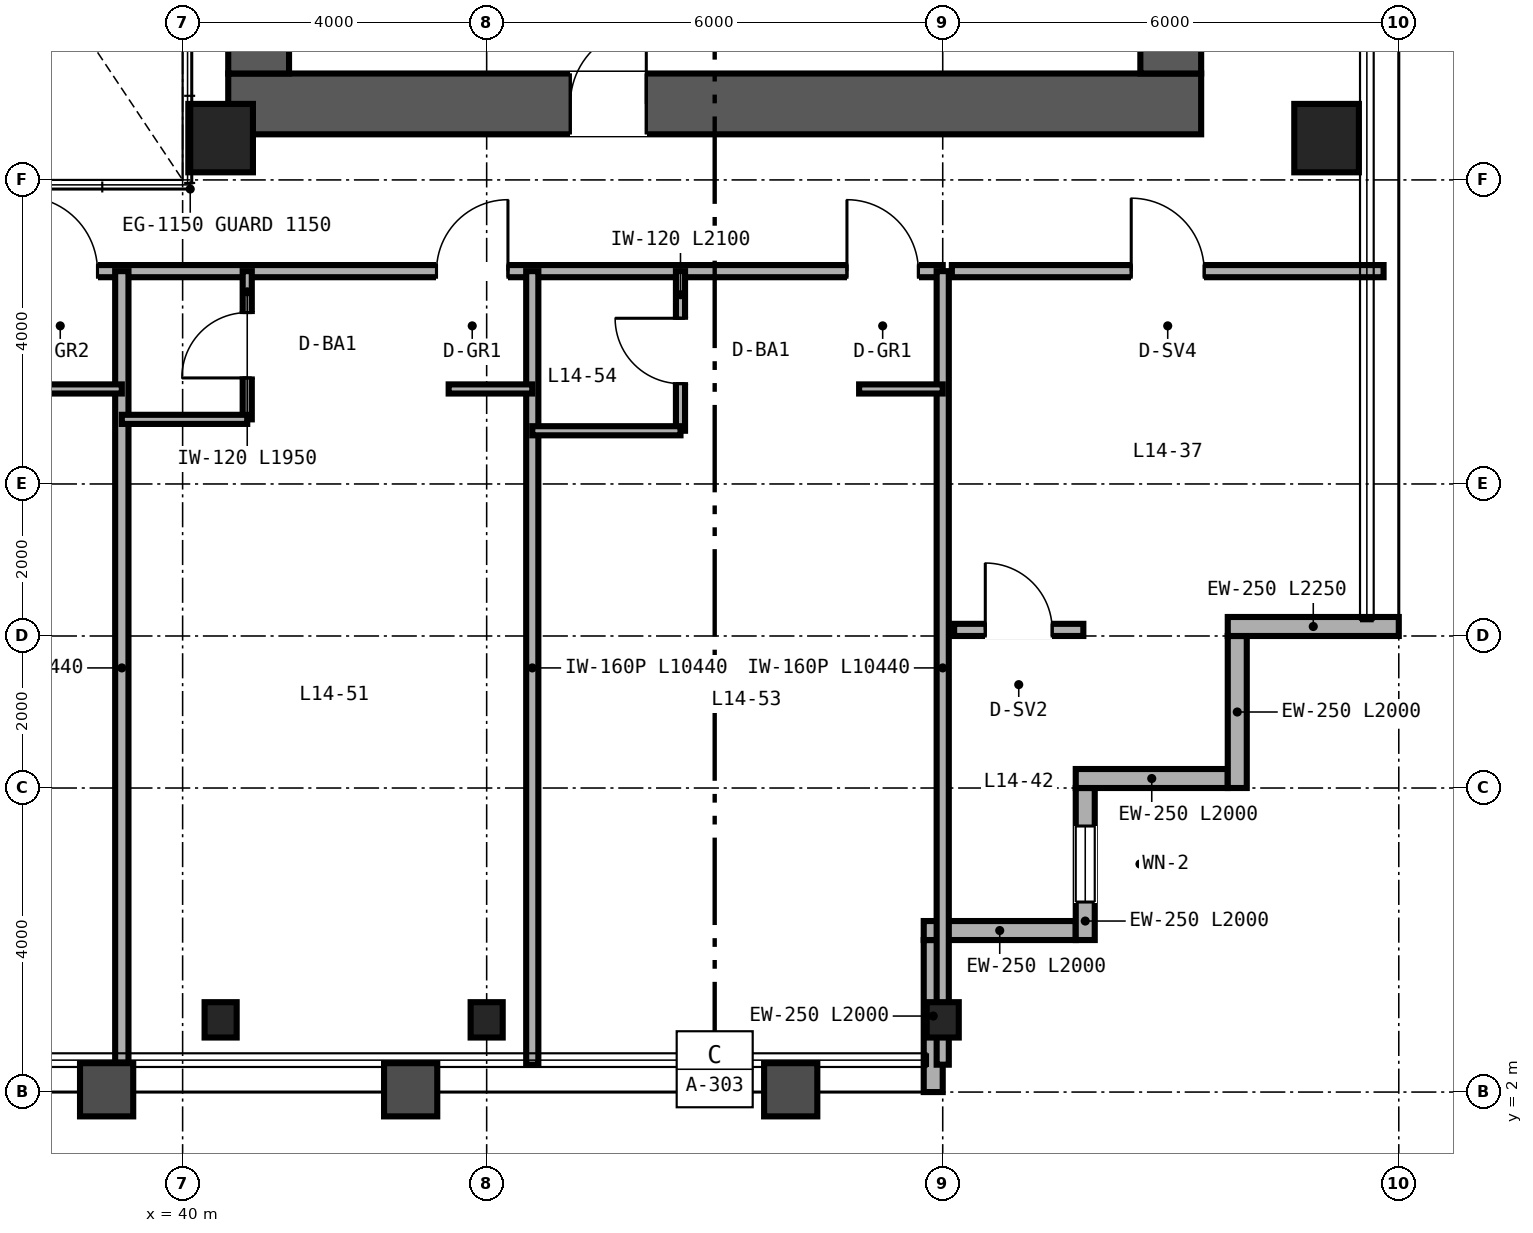
"""IFC4 building model, lengths in metres.
Left out: names, types, materials, properties, quantities, classifications, styles, units other than length and angle.
Written with IfcOpenShell. Run it as: python <this file> out.ifc"""

import sys

from ifc_helpers import new_model, si_unit, direction, frame, frame_2d, origin, origin_2d, place, context, subcontext, project, spatial, rectangle, hollow_rectangle, i_section, extrude, source, transform, mapped, element, fill, save


model = new_model("IFC4")
c1 = context("Model", 3, precision=1e-05, world=origin(), true_north=direction((0.0, 1.0)))
c2 = subcontext(c1, "Body", "Model", "MODEL_VIEW")
j1 = project(units=[si_unit("LENGTHUNIT", "METRE"), si_unit("PLANEANGLEUNIT", "RADIAN")], contexts=[c1])
p1 = place(None, origin())
s1 = spatial("IfcSite", under=j1, at=p1, CompositionType="ELEMENT")
p2 = place(p1, origin())
s2 = spatial("IfcBuilding", under=s1, at=p2, CompositionType="ELEMENT")
p3 = place(p2, frame((0.0, 0.0, 60.0)))
s3 = spatial("IfcBuildingStorey", under=s2, at=p3, CompositionType="ELEMENT", Elevation=60.0)
p4 = place(p3, frame((40.6, 15.0, 0.0), z_axis=(0.0, 0.0, 1.0), x_axis=(1.0, 0.0, 0.0)))
e1 = element("IfcWall", 1, at=p4, inside=s3, PredefinedType="SHEAR", context=c2, shape_type="SweptSolid", body=[
    extrude(rectangle(XDim=12.8, YDim=0.8, at=frame_2d((6.4, 0.0))), origin(), (0.0, 0.0, 1.0), 3.35),
])
p5 = place(p4, frame((4.5, 0.0, 0.0)))
e2 = element("IfcOpeningElement", 2, at=p5, cuts=e1, PredefinedType="OPENING", context=c2, shape_type="SweptSolid", body=[
    extrude(rectangle(XDim=1.0, YDim=2.15, at=frame_2d((0.5, 1.075))), frame((0.0, 0.41, 0.0), z_axis=(0.0, -1.0, 0.0), x_axis=(1.0, 0.0, 0.0)), (0.0, 0.0, 1.0), 0.82),
])
for number, where, z_axis, x_axis in (
    (3, (41.0, 15.4, 0.0), (0.0, 0.0, 1.0), (0.0, 1.0, 0.0)),
    (4, (53.0, 15.4, 0.0), (0.0, 0.0, 1.0), (0.0, 1.0, 0.0)),
):
    element("IfcWall", number, at=place(p3, frame(where, z_axis=z_axis, x_axis=x_axis)), inside=s3, PredefinedType="SHEAR", context=c2, shape_type="SweptSolid", body=[
        extrude(rectangle(XDim=21.2, YDim=0.8, at=frame_2d((10.6, 0.0))), origin(), (0.0, 0.0, 1.0), 3.35),
    ])
m1 = source(origin(), c2, "Body", "SweptSolid", [
    extrude(hollow_rectangle(XDim=0.85, YDim=0.9, WallThickness=0.04, at=origin_2d()), origin(), (0.0, 0.0, 1.0), 3.35),
])
for number, where, z_axis, x_axis in (
    (5, (40.5, 14.55, 0.0), (0.0, 0.0, 1.0), (1.0, 0.0, 0.0)),
    (6, (55.05, 14.55, 0.0), (0.0, 0.0, 1.0), (1.0, 0.0, 0.0)),
):
    element("IfcColumn", number, at=place(p3, frame(where, z_axis=z_axis, x_axis=x_axis)), inside=s3, PredefinedType="COLUMN", context=c2, shape_type="MappedRepresentation", body=[
        mapped(m1, transform((0.0, 0.0, 0.0), scale=1.0)),
    ])
m2 = source(origin(), c2, "Body", "SweptSolid", [
    extrude(i_section(OverallWidth=0.422, OverallDepth=0.465, WebThickness=0.045, FlangeThickness=0.073, FilletRadius=0.025, at=origin_2d()), origin(), (0.0, 0.0, 1.0), 3.35),
])
for number, where, z_axis, x_axis in (
    (7, (40.5, 2.95, 0.0), (0.0, 0.0, 1.0), (1.0, 0.0, 0.0)),
    (8, (44.0, 2.95, 0.0), (0.0, 0.0, 1.0), (1.0, 0.0, 0.0)),
    (9, (50.0, 2.95, 0.0), (0.0, 0.0, 1.0), (1.0, 0.0, 0.0)),
):
    element("IfcColumn", number, at=place(p3, frame(where, z_axis=z_axis, x_axis=x_axis)), inside=s3, PredefinedType="COLUMN", context=c2, shape_type="MappedRepresentation", body=[
        mapped(m2, transform((0.0, 0.0, 0.0), scale=1.0)),
    ])
p6 = place(p3, frame((49.875, 2.0, 0.0), z_axis=(0.0, 0.0, 1.0), x_axis=(0.0, 1.0, 0.0)))
e10 = element("IfcWall", 10, at=p6, inside=s3, PredefinedType="SOLIDWALL", context=c2, shape_type="SweptSolid", body=[
    extrude(rectangle(XDim=2.0, YDim=0.25, at=frame_2d((1.0, 0.0))), origin(), (0.0, 0.0, 1.0), 2.657),
])
p7 = place(p3, frame((49.75, 4.125, 0.0), z_axis=(0.0, 0.0, 1.0), x_axis=(1.0, 0.0, 0.0)))
e11 = element("IfcWall", 11, at=p7, inside=s3, PredefinedType="SOLIDWALL", context=c2, shape_type="SweptSolid", body=[
    extrude(rectangle(XDim=2.0, YDim=0.25, at=frame_2d((1.0, 0.0))), origin(), (0.0, 0.0, 1.0), 3.35),
])
p8 = place(p3, frame((51.875, 4.0, 0.0), z_axis=(0.0, 0.0, 1.0), x_axis=(0.0, 1.0, 0.0)))
e12 = element("IfcWall", 12, at=p8, inside=s3, PredefinedType="SOLIDWALL", context=c2, shape_type="SweptSolid", body=[
    extrude(rectangle(XDim=2.0, YDim=0.25, at=frame_2d((1.0, 0.0))), origin(), (0.0, 0.0, 1.0), 3.35),
])
p9 = place(p8, frame((0.5, 0.0, 0.85)))
e13 = element("IfcOpeningElement", 13, at=p9, cuts=e12, PredefinedType="OPENING", context=c2, shape_type="SweptSolid", body=[
    extrude(rectangle(XDim=1.0, YDim=1.9, at=frame_2d((0.5, 0.95))), frame((0.0, 0.135, 0.0), z_axis=(0.0, -1.0, 0.0), x_axis=(1.0, 0.0, 0.0)), (0.0, 0.0, 1.0), 0.27),
])
for number, where, z_axis, x_axis in (
    (14, (51.75, 6.125, 0.0), (0.0, 0.0, 1.0), (1.0, 0.0, 0.0)),
    (15, (53.875, 6.0, 0.0), (0.0, 0.0, 1.0), (0.0, 1.0, 0.0)),
):
    element("IfcWall", number, at=place(p3, frame(where, z_axis=z_axis, x_axis=x_axis)), inside=s3, PredefinedType="SOLIDWALL", context=c2, shape_type="SweptSolid", body=[
        extrude(rectangle(XDim=2.0, YDim=0.25, at=frame_2d((1.0, 0.0))), origin(), (0.0, 0.0, 1.0), 3.35),
    ])
p10 = place(p3, frame((53.75, 8.125, 0.0), z_axis=(0.0, 0.0, 1.0), x_axis=(1.0, 0.0, 0.0)))
e16 = element("IfcWall", 16, at=p10, inside=s3, PredefinedType="SOLIDWALL", context=c2, shape_type="SweptSolid", body=[
    extrude(rectangle(XDim=2.25, YDim=0.25, at=frame_2d((1.125, 0.0))), origin(), (0.0, 0.0, 1.0), 3.35),
])
p11 = place(p3, frame((50.12, 12.8, 0.0), z_axis=(0.0, 0.0, 1.0), x_axis=(1.0, 0.0, 0.0)))
e17 = element("IfcWall", 17, at=p11, inside=s3, PredefinedType="PARTITIONING", context=c2, shape_type="SweptSolid", body=[
    extrude(rectangle(XDim=5.68, YDim=0.16, at=frame_2d((2.84, 0.0))), origin(), (0.0, 0.0, 1.0), 3.35),
])
p12 = place(p11, frame((2.36, 0.0, 0.0)))
e18 = element("IfcOpeningElement", 18, at=p12, cuts=e17, PredefinedType="OPENING", context=c2, shape_type="SweptSolid", body=[
    extrude(rectangle(XDim=0.96, YDim=2.15, at=frame_2d((0.48, 1.075))), frame((0.0, 0.09, 0.0), z_axis=(0.0, -1.0, 0.0), x_axis=(1.0, 0.0, 0.0)), (0.0, 0.0, 1.0), 0.18),
])
p13 = place(p3, frame((50.15, 8.08, 0.0), z_axis=(0.0, 0.0, 1.0), x_axis=(1.0, 0.0, 0.0)))
e19 = element("IfcWall", 19, at=p13, inside=s3, PredefinedType="PARTITIONING", context=c2, shape_type="SweptSolid", body=[
    extrude(rectangle(XDim=1.7, YDim=0.16, at=frame_2d((0.85, 0.0))), origin(), (0.0, 0.0, 1.0), 3.35),
])
p14 = place(p13, frame((0.41, 0.0, 0.0)))
e20 = element("IfcOpeningElement", 20, at=p14, cuts=e19, PredefinedType="OPENING", context=c2, shape_type="SweptSolid", body=[
    extrude(rectangle(XDim=0.88, YDim=2.15, at=frame_2d((0.44, 1.075))), frame((0.0, 0.09, 0.0), z_axis=(0.0, -1.0, 0.0), x_axis=(1.0, 0.0, 0.0)), (0.0, 0.0, 1.0), 0.18),
])
p15 = place(p3, frame((14.0, 12.8, 0.0), z_axis=(0.0, 0.0, 1.0), x_axis=(1.0, 0.0, 0.0)))
e21 = element("IfcWall", 21, at=p15, inside=s3, PredefinedType="PARTITIONING", context=c2, shape_type="SweptSolid", body=[
    extrude(rectangle(XDim=36.0, YDim=0.16, at=frame_2d((18.0, 0.0))), origin(), (0.0, 0.0, 1.0), 2.571),
])
p16 = place(p15, frame((7.1, 0.0, 0.0)))
e22 = element("IfcOpeningElement", 22, at=p16, cuts=e21, PredefinedType="OPENING", context=c2, shape_type="SweptSolid", body=[
    extrude(rectangle(XDim=0.98, YDim=2.2, at=frame_2d((0.49, 1.1))), frame((0.0, 0.09, 0.0), z_axis=(0.0, -1.0, 0.0), x_axis=(1.0, 0.0, 0.0)), (0.0, 0.0, 1.0), 0.18),
])
p17 = place(p15, frame((15.5, 0.0, 0.0)))
e23 = element("IfcOpeningElement", 23, at=p17, cuts=e21, PredefinedType="OPENING", context=c2, shape_type="SweptSolid", body=[
    extrude(rectangle(XDim=0.98, YDim=2.2, at=frame_2d((0.49, 1.1))), frame((0.0, 0.09, 0.0), z_axis=(0.0, -1.0, 0.0), x_axis=(1.0, 0.0, 0.0)), (0.0, 0.0, 1.0), 0.18),
])
p18 = place(p15, frame((23.9, 0.0, 0.0)))
e24 = element("IfcOpeningElement", 24, at=p18, cuts=e21, PredefinedType="OPENING", context=c2, shape_type="SweptSolid", body=[
    extrude(rectangle(XDim=0.98, YDim=2.2, at=frame_2d((0.49, 1.1))), frame((0.0, 0.09, 0.0), z_axis=(0.0, -1.0, 0.0), x_axis=(1.0, 0.0, 0.0)), (0.0, 0.0, 1.0), 0.18),
])
p19 = place(p15, frame((29.34, 0.0, 0.0)))
e25 = element("IfcOpeningElement", 25, at=p19, cuts=e21, PredefinedType="OPENING", context=c2, shape_type="SweptSolid", body=[
    extrude(rectangle(XDim=0.94, YDim=2.15, at=frame_2d((0.47, 1.075))), frame((0.0, 0.09, 0.0), z_axis=(0.0, -1.0, 0.0), x_axis=(1.0, 0.0, 0.0)), (0.0, 0.0, 1.0), 0.18),
])
p20 = place(p15, frame((34.74, 0.0, 0.0)))
e26 = element("IfcOpeningElement", 26, at=p20, cuts=e21, PredefinedType="OPENING", context=c2, shape_type="SweptSolid", body=[
    extrude(rectangle(XDim=0.94, YDim=2.15, at=frame_2d((0.47, 1.075))), frame((0.0, 0.09, 0.0), z_axis=(0.0, -1.0, 0.0), x_axis=(1.0, 0.0, 0.0)), (0.0, 0.0, 1.0), 0.18),
])
p21 = place(p3, frame((50.0, 2.36, 0.0), z_axis=(0.0, 0.0, 1.0), x_axis=(0.0, 1.0, 0.0)))
e27 = element("IfcWall", 27, at=p21, inside=s3, PredefinedType="PARTITIONING", context=c2, shape_type="SweptSolid", body=[
    extrude(rectangle(XDim=10.44, YDim=0.16, at=frame_2d((5.22, 0.0))), origin(), (0.0, 0.0, 1.0), 2.657),
])
p22 = place(p3, frame((39.2, 2.36, 0.0), z_axis=(0.0, 0.0, 1.0), x_axis=(0.0, 1.0, 0.0)))
e28 = element("IfcWall", 28, at=p22, inside=s3, PredefinedType="PARTITIONING", context=c2, shape_type="SweptSolid", body=[
    extrude(rectangle(XDim=10.44, YDim=0.175, at=frame_2d((5.22, 0.0))), origin(), (0.0, 0.0, 1.0), 2.423),
])
p23 = place(p3, frame((38.1, 11.25, 0.0), z_axis=(0.0, 0.0, 1.0), x_axis=(1.0, 0.0, 0.0)))
e29 = element("IfcWall", 29, at=p23, inside=s3, PredefinedType="PARTITIONING", context=c2, shape_type="SweptSolid", body=[
    extrude(rectangle(XDim=1.1, YDim=0.12, at=frame_2d((0.55, 0.0))), origin(), (0.0, 0.0, 1.0), 3.35),
])
p24 = place(p3, frame((44.6, 2.36, 0.0), z_axis=(0.0, 0.0, 1.0), x_axis=(0.0, 1.0, 0.0)))
e30 = element("IfcWall", 30, at=p24, inside=s3, PredefinedType="PARTITIONING", context=c2, shape_type="SweptSolid", body=[
    extrude(rectangle(XDim=10.44, YDim=0.16, at=frame_2d((5.22, 0.0))), origin(), (0.0, 0.0, 1.0), 2.657),
])
p25 = place(p3, frame((40.85, 10.85, 0.0), z_axis=(0.0, 0.0, 1.0), x_axis=(0.0, 1.0, 0.0)))
e31 = element("IfcWall", 31, at=p25, inside=s3, PredefinedType="PARTITIONING", context=c2, shape_type="SweptSolid", body=[
    extrude(rectangle(XDim=1.95, YDim=0.12, at=frame_2d((0.975, 0.0))), origin(), (0.0, 0.0, 1.0), 3.35),
])
p26 = place(p25, frame((0.545, 0.0, 0.0)))
e32 = element("IfcOpeningElement", 32, at=p26, cuts=e31, PredefinedType="OPENING", context=c2, shape_type="SweptSolid", body=[
    extrude(rectangle(XDim=0.86, YDim=2.1, at=frame_2d((0.43, 1.05))), frame((0.0, 0.07, 0.0), z_axis=(0.0, -1.0, 0.0), x_axis=(1.0, 0.0, 0.0)), (0.0, 0.0, 1.0), 0.14),
])
p27 = place(p3, frame((39.2, 10.85, 0.0), z_axis=(0.0, 0.0, 1.0), x_axis=(1.0, 0.0, 0.0)))
e33 = element("IfcWall", 33, at=p27, inside=s3, PredefinedType="PARTITIONING", context=c2, shape_type="SweptSolid", body=[
    extrude(rectangle(XDim=1.65, YDim=0.12, at=frame_2d((0.825, 0.0))), origin(), (0.0, 0.0, 1.0), 2.571),
])
p28 = place(p3, frame((43.5, 11.25, 0.0), z_axis=(0.0, 0.0, 1.0), x_axis=(1.0, 0.0, 0.0)))
e34 = element("IfcWall", 34, at=p28, inside=s3, PredefinedType="PARTITIONING", context=c2, shape_type="SweptSolid", body=[
    extrude(rectangle(XDim=1.1, YDim=0.12, at=frame_2d((0.55, 0.0))), origin(), (0.0, 0.0, 1.0), 3.35),
])
p29 = place(p3, frame((46.55, 10.7, 0.0), z_axis=(0.0, 0.0, 1.0), x_axis=(0.0, 1.0, 0.0)))
e35 = element("IfcWall", 35, at=p29, inside=s3, PredefinedType="PARTITIONING", context=c2, shape_type="SweptSolid", body=[
    extrude(rectangle(XDim=2.1, YDim=0.12, at=frame_2d((1.05, 0.0))), origin(), (0.0, 0.0, 1.0), 3.35),
])
p30 = place(p29, frame((0.62, 0.0, 0.0)))
e36 = element("IfcOpeningElement", 36, at=p30, cuts=e35, PredefinedType="OPENING", context=c2, shape_type="SweptSolid", body=[
    extrude(rectangle(XDim=0.86, YDim=2.1, at=frame_2d((0.43, 1.05))), frame((0.0, 0.07, 0.0), z_axis=(0.0, -1.0, 0.0), x_axis=(1.0, 0.0, 0.0)), (0.0, 0.0, 1.0), 0.14),
])
p31 = place(p3, frame((44.6, 10.7, 0.0), z_axis=(0.0, 0.0, 1.0), x_axis=(1.0, 0.0, 0.0)))
e37 = element("IfcWall", 37, at=p31, inside=s3, PredefinedType="PARTITIONING", context=c2, shape_type="SweptSolid", body=[
    extrude(rectangle(XDim=1.95, YDim=0.12, at=frame_2d((0.975, 0.0))), origin(), (0.0, 0.0, 1.0), 3.35),
])
p32 = place(p3, frame((48.9, 11.25, 0.0), z_axis=(0.0, 0.0, 1.0), x_axis=(1.0, 0.0, 0.0)))
e38 = element("IfcWall", 38, at=p32, inside=s3, PredefinedType="PARTITIONING", context=c2, shape_type="SweptSolid", body=[
    extrude(rectangle(XDim=1.1, YDim=0.12, at=frame_2d((0.55, 0.0))), origin(), (0.0, 0.0, 1.0), 3.35),
])
m3 = source(origin(), c2, "Body", "SweptSolid", [
    extrude(rectangle(XDim=1.0, YDim=1.9, at=frame_2d((0.5, 0.95))), frame((0.0, 0.03, 0.0), z_axis=(0.0, -1.0, 0.0), x_axis=(1.0, 0.0, 0.0)), (0.0, 0.0, 1.0), 0.06),
])
p33 = place(p9, origin())
e39 = element("IfcWindow", 39, at=p33, inside=s3, PartitioningType="SINGLE_PANEL", PredefinedType="WINDOW", context=c2, shape_type="MappedRepresentation", body=[
    mapped(m3, transform((0.0, 0.0, 0.0), scale=1.0)),
])
fill(e13, e39)
m4 = source(origin(), c2, "Body", "SweptSolid", [
    extrude(rectangle(XDim=1.0, YDim=2.15, at=frame_2d((0.5, 1.075))), frame((0.0, 0.025, 0.0), z_axis=(0.0, -1.0, 0.0), x_axis=(1.0, 0.0, 0.0)), (0.0, 0.0, 1.0), 0.05),
])
p34 = place(p5, origin())
e40 = element("IfcDoor", 40, at=p34, inside=s3, OperationType="SINGLE_SWING_RIGHT", PredefinedType="DOOR", context=c2, shape_type="MappedRepresentation", body=[
    mapped(m4, transform((0.0, 0.0, 0.0), scale=1.0)),
])
fill(e2, e40)
m5 = source(origin(), c2, "Body", "SweptSolid", [
    extrude(rectangle(XDim=0.96, YDim=2.15, at=frame_2d((0.48, 1.075))), frame((0.0, 0.025, 0.0), z_axis=(0.0, -1.0, 0.0), x_axis=(1.0, 0.0, 0.0)), (0.0, 0.0, 1.0), 0.05),
])
p35 = place(p12, origin())
e41 = element("IfcDoor", 41, at=p35, inside=s3, OperationType="SINGLE_SWING_LEFT", PredefinedType="DOOR", context=c2, shape_type="MappedRepresentation", body=[
    mapped(m5, transform((0.0, 0.0, 0.0), scale=1.0)),
])
fill(e18, e41)
m6 = source(origin(), c2, "Body", "SweptSolid", [
    extrude(rectangle(XDim=0.88, YDim=2.15, at=frame_2d((0.44, 1.075))), frame((0.0, 0.025, 0.0), z_axis=(0.0, -1.0, 0.0), x_axis=(1.0, 0.0, 0.0)), (0.0, 0.0, 1.0), 0.05),
])
p36 = place(p14, origin())
e42 = element("IfcDoor", 42, at=p36, inside=s3, OperationType="SINGLE_SWING_LEFT", PredefinedType="DOOR", context=c2, shape_type="MappedRepresentation", body=[
    mapped(m6, transform((0.0, 0.0, 0.0), scale=1.0)),
])
fill(e20, e42)
m7 = source(origin(), c2, "Body", "SweptSolid", [
    extrude(rectangle(XDim=0.86, YDim=2.1, at=frame_2d((0.43, 1.05))), frame((0.0, 0.025, 0.0), z_axis=(0.0, -1.0, 0.0), x_axis=(1.0, 0.0, 0.0)), (0.0, 0.0, 1.0), 0.05),
])
p37 = place(p26, origin())
e43 = element("IfcDoor", 43, at=p37, inside=s3, OperationType="SINGLE_SWING_LEFT", PredefinedType="DOOR", context=c2, shape_type="MappedRepresentation", body=[
    mapped(m7, transform((0.0, 0.0, 0.0), scale=1.0)),
])
fill(e32, e43)
p38 = place(p30, origin())
e44 = element("IfcDoor", 44, at=p38, inside=s3, OperationType="SINGLE_SWING_RIGHT", PredefinedType="DOOR", context=c2, shape_type="MappedRepresentation", body=[
    mapped(m7, transform((0.0, 0.0, 0.0), scale=1.0)),
])
fill(e36, e44)
m8 = source(origin(), c2, "Body", "SweptSolid", [
    extrude(rectangle(XDim=0.98, YDim=2.2, at=frame_2d((0.49, 1.1))), frame((0.0, 0.025, 0.0), z_axis=(0.0, -1.0, 0.0), x_axis=(1.0, 0.0, 0.0)), (0.0, 0.0, 1.0), 0.05),
])
p39 = place(p18, origin())
e45 = element("IfcDoor", 45, at=p39, inside=s3, OperationType="SINGLE_SWING_LEFT", PredefinedType="DOOR", context=c2, shape_type="MappedRepresentation", body=[
    mapped(m8, transform((0.0, 0.0, 0.0), scale=1.0)),
])
fill(e24, e45)
m9 = source(origin(), c2, "Body", "SweptSolid", [
    extrude(rectangle(XDim=0.94, YDim=2.15, at=frame_2d((0.47, 1.075))), frame((0.0, 0.025, 0.0), z_axis=(0.0, -1.0, 0.0), x_axis=(1.0, 0.0, 0.0)), (0.0, 0.0, 1.0), 0.05),
])
p40 = place(p19, origin())
e46 = element("IfcDoor", 46, at=p40, inside=s3, OperationType="SINGLE_SWING_RIGHT", PredefinedType="DOOR", context=c2, shape_type="MappedRepresentation", body=[
    mapped(m9, transform((0.0, 0.0, 0.0), scale=1.0)),
])
fill(e25, e46)
p41 = place(p20, origin())
e47 = element("IfcDoor", 47, at=p41, inside=s3, OperationType="SINGLE_SWING_LEFT", PredefinedType="DOOR", context=c2, shape_type="MappedRepresentation", body=[
    mapped(m9, transform((0.0, 0.0, 0.0), scale=1.0)),
])
fill(e26, e47)
save(model, sys.argv[1])
